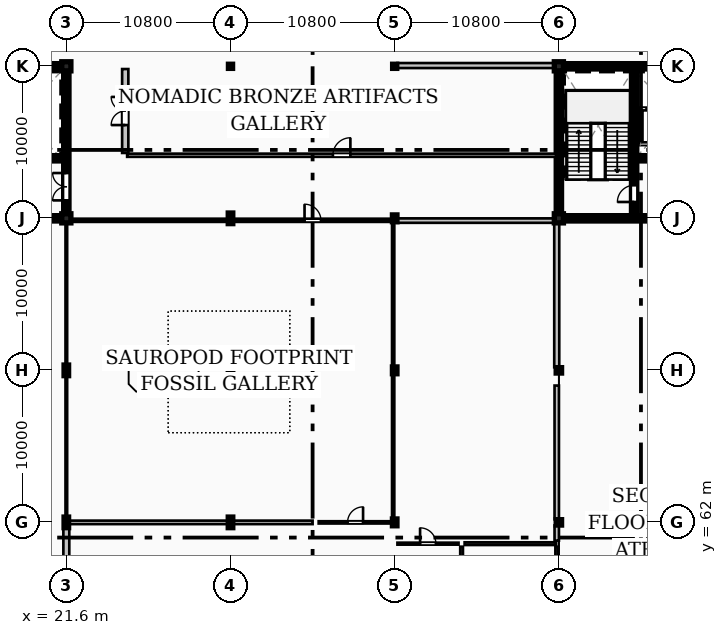
"""IFC4 building model, lengths in metres.
Left out: names, types, materials, properties, quantities, classifications, styles, units other than length and angle.
Written with IfcOpenShell. Run it as: python <this file> out.ifc"""

import sys

from ifc_helpers import new_model, si_unit, direction, frame, frame_2d, origin, origin_2d, place, context, subcontext, project, spatial, rectangle, hollow_circle, i_section, extrude, element, fill, save


model = new_model("IFC4")
c1 = context("Model", 3, precision=1e-05, world=origin(), true_north=direction((0.0, 1.0)))
c2 = subcontext(c1, "Body", "Model", "MODEL_VIEW")
j1 = project(units=[si_unit("LENGTHUNIT", "METRE"), si_unit("PLANEANGLEUNIT", "RADIAN")], contexts=[c1])
p1 = place(None, origin())
s1 = spatial("IfcSite", under=j1, at=p1, CompositionType="ELEMENT")
p2 = place(p1, origin())
s2 = spatial("IfcBuilding", under=s1, at=p2, CompositionType="ELEMENT")
p3 = place(p2, frame((0.0, 0.0, 9.6)))
s3 = spatial("IfcBuildingStorey", under=s2, at=p3, CompositionType="ELEMENT", Elevation=9.6)
for number, where, z_axis, x_axis in (
    (1, (21.6, 62.0, 0.0), (0.0, 0.0, 1.0), (1.0, 0.0, 0.0)),
    (2, (21.6, 72.0, 0.0), (0.0, 0.0, 1.0), (1.0, 0.0, 0.0)),
):
    element("IfcColumn", number, at=place(p3, frame(where, z_axis=z_axis, x_axis=x_axis)), inside=s3, PredefinedType="COLUMN", context=c2, shape_type="SweptSolid", body=[
        extrude(i_section(OverallWidth=0.3, OverallDepth=0.7, WebThickness=0.017, FlangeThickness=0.032, FilletRadius=0.027, at=origin_2d()), origin(), (0.0, 0.0, 1.0), 4.8),
    ])
for number, where, z_axis, x_axis in (
    (3, (21.6, 82.0, 0.0), (0.0, 0.0, 1.0), (1.0, 0.0, 0.0)),
    (4, (21.6, 92.0, 0.0), (0.0, 0.0, 1.0), (1.0, 0.0, 0.0)),
):
    element("IfcColumn", number, at=place(p3, frame(where, z_axis=z_axis, x_axis=x_axis)), inside=s3, PredefinedType="COLUMN", context=c2, shape_type="SweptSolid", body=[
        extrude(rectangle(XDim=0.6, YDim=0.6, at=origin_2d()), origin(), (0.0, 0.0, 1.0), 4.8),
    ])
for number, where, z_axis, x_axis in (
    (5, (32.4, 62.0, 0.0), (0.0, 0.0, 1.0), (1.0, 0.0, 0.0)),
    (6, (32.4, 72.0, 0.0), (0.0, 0.0, 1.0), (1.0, 0.0, 0.0)),
    (7, (32.4, 82.0, 0.0), (0.0, 0.0, 1.0), (1.0, 0.0, 0.0)),
):
    element("IfcColumn", number, at=place(p3, frame(where, z_axis=z_axis, x_axis=x_axis)), inside=s3, PredefinedType="COLUMN", context=c2, shape_type="SweptSolid", body=[
        extrude(i_section(OverallWidth=0.3, OverallDepth=0.7, WebThickness=0.017, FlangeThickness=0.032, FilletRadius=0.027, at=origin_2d()), origin(), (0.0, 0.0, 1.0), 4.8),
    ])
p4 = place(p3, frame((32.4, 92.0, 0.0), z_axis=(0.0, 0.0, 1.0), x_axis=(1.0, 0.0, 0.0)))
e8 = element("IfcColumn", 8, at=p4, inside=s3, PredefinedType="COLUMN", context=c2, shape_type="SweptSolid", body=[
    extrude(hollow_circle(Radius=0.136, WallThickness=0.012, at=origin_2d()), origin(), (0.0, 0.0, 1.0), 4.8),
])
for number, where, z_axis, x_axis in (
    (9, (43.2, 62.0, 0.0), (0.0, 0.0, 1.0), (1.0, 0.0, 0.0)),
    (10, (43.2, 72.0, 0.0), (0.0, 0.0, 1.0), (1.0, 0.0, 0.0)),
    (11, (43.2, 82.0, 0.0), (0.0, 0.0, 1.0), (1.0, 0.0, 0.0)),
):
    element("IfcColumn", number, at=place(p3, frame(where, z_axis=z_axis, x_axis=x_axis)), inside=s3, PredefinedType="COLUMN", context=c2, shape_type="SweptSolid", body=[
        extrude(i_section(OverallWidth=0.3, OverallDepth=0.45, WebThickness=0.014, FlangeThickness=0.026, FilletRadius=0.027, at=origin_2d()), origin(), (0.0, 0.0, 1.0), 4.8),
    ])
p5 = place(p3, frame((43.2, 92.0, 0.0), z_axis=(0.0, 0.0, 1.0), x_axis=(1.0, 0.0, 0.0)))
e12 = element("IfcColumn", 12, at=p5, inside=s3, PredefinedType="COLUMN", context=c2, shape_type="SweptSolid", body=[
    extrude(hollow_circle(Radius=0.136, WallThickness=0.012, at=origin_2d()), origin(), (0.0, 0.0, 1.0), 4.8),
])
for number, where, z_axis, x_axis in (
    (13, (54.0, 62.0, 0.0), (0.0, 0.0, 1.0), (1.0, 0.0, 0.0)),
    (14, (54.0, 72.0, 0.0), (0.0, 0.0, 1.0), (1.0, 0.0, 0.0)),
):
    element("IfcColumn", number, at=place(p3, frame(where, z_axis=z_axis, x_axis=x_axis)), inside=s3, PredefinedType="COLUMN", context=c2, shape_type="SweptSolid", body=[
        extrude(hollow_circle(Radius=0.178, WallThickness=0.016, at=origin_2d()), origin(), (0.0, 0.0, 1.0), 4.8),
    ])
for number, where, z_axis, x_axis in (
    (15, (54.0, 82.0, 0.0), (0.0, 0.0, 1.0), (1.0, 0.0, 0.0)),
    (16, (54.0, 92.0, 0.0), (0.0, 0.0, 1.0), (1.0, 0.0, 0.0)),
):
    element("IfcColumn", number, at=place(p3, frame(where, z_axis=z_axis, x_axis=x_axis)), inside=s3, PredefinedType="COLUMN", context=c2, shape_type="SweptSolid", body=[
        extrude(rectangle(XDim=0.6, YDim=0.6, at=origin_2d()), origin(), (0.0, 0.0, 1.0), 4.8),
    ])
for number, where, z_axis, x_axis in (
    (17, (11.1, 82.0, 0.0), (0.0, 0.0, 1.0), (1.0, 0.0, 0.0)),
    (18, (11.1, 92.0, 0.0), (0.0, 0.0, 1.0), (1.0, 0.0, 0.0)),
):
    element("IfcWall", number, at=place(p3, frame(where, z_axis=z_axis, x_axis=x_axis)), inside=s3, PredefinedType="SHEAR", context=c2, shape_type="SweptSolid", body=[
        extrude(rectangle(XDim=10.2, YDim=0.35, at=frame_2d((5.1, 0.0))), origin(), (0.0, 0.0, 1.0), 4.56),
    ])
p6 = place(p3, frame((21.6, 82.3, 0.0), z_axis=(0.0, 0.0, 1.0), x_axis=(0.0, 1.0, 0.0)))
e19 = element("IfcWall", 19, at=p6, inside=s3, PredefinedType="SHEAR", context=c2, shape_type="SweptSolid", body=[
    extrude(rectangle(XDim=9.4, YDim=0.35, at=frame_2d((4.7, 0.0))), origin(), (0.0, 0.0, 1.0), 4.56),
])
p7 = place(p6, frame((0.88, 0.0, 0.0)))
e20 = element("IfcOpeningElement", 20, at=p7, cuts=e19, PredefinedType="OPENING", context=c2, shape_type="SweptSolid", body=[
    extrude(rectangle(XDim=1.8, YDim=2.25, at=frame_2d((0.9, 1.125))), frame((0.0, 0.185, 0.0), z_axis=(0.0, -1.0, 0.0), x_axis=(1.0, 0.0, 0.0)), (0.0, 0.0, 1.0), 0.37),
])
p8 = place(p3, frame((15.93, 85.95, 0.0), z_axis=(0.0, 0.0, 1.0), x_axis=(1.0, 0.0, 0.0)))
e21 = element("IfcWall", 21, at=p8, inside=s3, PredefinedType="SHEAR", context=c2, shape_type="SweptSolid", body=[
    extrude(rectangle(XDim=5.49, YDim=0.35, at=frame_2d((2.745, 0.0))), origin(), (0.0, 0.0, 1.0), 4.56),
])
p9 = place(p8, frame((0.65, 0.0, 0.0)))
e22 = element("IfcOpeningElement", 22, at=p9, cuts=e21, PredefinedType="OPENING", context=c2, shape_type="SweptSolid", body=[
    extrude(rectangle(XDim=1.1, YDim=2.2, at=frame_2d((0.55, 1.1))), frame((0.0, 0.185, 0.0), z_axis=(0.0, -1.0, 0.0), x_axis=(1.0, 0.0, 0.0)), (0.0, 0.0, 1.0), 0.37),
])
p10 = place(p8, frame((2.85, 0.0, 0.0)))
e23 = element("IfcOpeningElement", 23, at=p10, cuts=e21, PredefinedType="OPENING", context=c2, shape_type="SweptSolid", body=[
    extrude(rectangle(XDim=1.1, YDim=2.2, at=frame_2d((0.55, 1.1))), frame((0.0, 0.185, 0.0), z_axis=(0.0, -1.0, 0.0), x_axis=(1.0, 0.0, 0.0)), (0.0, 0.0, 1.0), 0.37),
])
for number, where, z_axis, x_axis in (
    (24, (54.3, 82.0, 0.0), (0.0, 0.0, 1.0), (1.0, 0.0, 0.0)),
    (25, (54.3, 92.0, 0.0), (0.0, 0.0, 1.0), (1.0, 0.0, 0.0)),
):
    element("IfcWall", number, at=place(p3, frame(where, z_axis=z_axis, x_axis=x_axis)), inside=s3, PredefinedType="SHEAR", context=c2, shape_type="SweptSolid", body=[
        extrude(rectangle(XDim=10.2, YDim=0.35, at=frame_2d((5.1, 0.0))), origin(), (0.0, 0.0, 1.0), 4.56),
    ])
p11 = place(p3, frame((54.0, 82.3, 0.0), z_axis=(0.0, 0.0, 1.0), x_axis=(0.0, 1.0, 0.0)))
e26 = element("IfcWall", 26, at=p11, inside=s3, PredefinedType="SHEAR", context=c2, shape_type="SweptSolid", body=[
    extrude(rectangle(XDim=9.4, YDim=0.35, at=frame_2d((4.7, 0.0))), origin(), (0.0, 0.0, 1.0), 4.56),
])
p12 = place(p3, frame((58.95, 82.175, 0.0), z_axis=(0.0, 0.0, 1.0), x_axis=(0.0, 1.0, 0.0)))
e27 = element("IfcWall", 27, at=p12, inside=s3, PredefinedType="SHEAR", context=c2, shape_type="SweptSolid", body=[
    extrude(rectangle(XDim=9.65, YDim=0.35, at=frame_2d((4.825, 0.0))), origin(), (0.0, 0.0, 1.0), 4.56),
])
p13 = place(p12, frame((0.9, 0.0, 0.0)))
e28 = element("IfcOpeningElement", 28, at=p13, cuts=e27, PredefinedType="OPENING", context=c2, shape_type="SweptSolid", body=[
    extrude(rectangle(XDim=1.1, YDim=2.2, at=frame_2d((0.55, 1.1))), frame((0.0, 0.185, 0.0), z_axis=(0.0, -1.0, 0.0), x_axis=(1.0, 0.0, 0.0)), (0.0, 0.0, 1.0), 0.37),
])
p14 = place(p3, frame((59.13, 85.95, 0.0), z_axis=(0.0, 0.0, 1.0), x_axis=(1.0, 0.0, 0.0)))
e29 = element("IfcWall", 29, at=p14, inside=s3, PredefinedType="SHEAR", context=c2, shape_type="SweptSolid", body=[
    extrude(rectangle(XDim=5.49, YDim=0.35, at=frame_2d((2.745, 0.0))), origin(), (0.0, 0.0, 1.0), 4.56),
])
p15 = place(p14, frame((0.65, 0.0, 0.0)))
e30 = element("IfcOpeningElement", 30, at=p15, cuts=e29, PredefinedType="OPENING", context=c2, shape_type="SweptSolid", body=[
    extrude(rectangle(XDim=1.1, YDim=2.2, at=frame_2d((0.55, 1.1))), frame((0.0, 0.185, 0.0), z_axis=(0.0, -1.0, 0.0), x_axis=(1.0, 0.0, 0.0)), (0.0, 0.0, 1.0), 0.37),
])
p16 = place(p14, frame((2.85, 0.0, 0.0)))
e31 = element("IfcOpeningElement", 31, at=p16, cuts=e29, PredefinedType="OPENING", context=c2, shape_type="SweptSolid", body=[
    extrude(rectangle(XDim=2.0, YDim=2.5, at=frame_2d((1.0, 1.25))), frame((0.0, 0.185, 0.0), z_axis=(0.0, -1.0, 0.0), x_axis=(1.0, 0.0, 0.0)), (0.0, 0.0, 1.0), 0.37),
])
p17 = place(p3, frame((43.38, 60.6, 0.0), z_axis=(0.0, 0.0, 1.0), x_axis=(1.0, 0.0, 0.0)))
e32 = element("IfcWall", 32, at=p17, inside=s3, PredefinedType="PARTITIONING", context=c2, shape_type="SweptSolid", body=[
    extrude(rectangle(XDim=4.02, YDim=0.13, at=frame_2d((2.01, 0.0))), origin(), (0.0, 0.0, 1.0), 4.52),
])
p18 = place(p17, frame((1.49, 0.0, 0.0)))
e33 = element("IfcOpeningElement", 33, at=p18, cuts=e32, PredefinedType="OPENING", context=c2, shape_type="SweptSolid", body=[
    extrude(rectangle(XDim=1.04, YDim=2.2, at=frame_2d((0.52, 1.1))), frame((0.0, 0.075, 0.0), z_axis=(0.0, -1.0, 0.0), x_axis=(1.0, 0.0, 0.0)), (0.0, 0.0, 1.0), 0.15),
])
p19 = place(p3, frame((38.2, 62.0, 0.0), z_axis=(0.0, 0.0, 1.0), x_axis=(1.0, 0.0, 0.0)))
e34 = element("IfcWall", 34, at=p19, inside=s3, PredefinedType="PARTITIONING", context=c2, shape_type="SweptSolid", body=[
    extrude(rectangle(XDim=4.82, YDim=0.15, at=frame_2d((2.41, 0.0))), origin(), (0.0, 0.0, 1.0), 4.099),
])
p20 = place(p19, frame((1.9, 0.0, 0.0)))
e35 = element("IfcOpeningElement", 35, at=p20, cuts=e34, PredefinedType="OPENING", context=c2, shape_type="SweptSolid", body=[
    extrude(rectangle(XDim=1.02, YDim=2.2, at=frame_2d((0.51, 1.1))), frame((0.0, 0.085, 0.0), z_axis=(0.0, -1.0, 0.0), x_axis=(1.0, 0.0, 0.0)), (0.0, 0.0, 1.0), 0.17),
])
p21 = place(p3, frame((21.78, 81.85, 0.0), z_axis=(0.0, 0.0, 1.0), x_axis=(1.0, 0.0, 0.0)))
e36 = element("IfcWall", 36, at=p21, inside=s3, PredefinedType="PARTITIONING", context=c2, shape_type="SweptSolid", body=[
    extrude(rectangle(XDim=10.42, YDim=0.17, at=frame_2d((5.21, 0.0))), origin(), (0.0, 0.0, 1.0), 3.94),
])
p22 = place(p3, frame((32.6, 81.85, 0.0), z_axis=(0.0, 0.0, 1.0), x_axis=(1.0, 0.0, 0.0)))
e37 = element("IfcWall", 37, at=p22, inside=s3, PredefinedType="PARTITIONING", context=c2, shape_type="SweptSolid", body=[
    extrude(rectangle(XDim=10.42, YDim=0.17, at=frame_2d((5.21, 0.0))), origin(), (0.0, 0.0, 1.0), 4.09),
])
p23 = place(p22, frame((4.67, 0.0, 0.0)))
e38 = element("IfcOpeningElement", 38, at=p23, cuts=e37, PredefinedType="OPENING", context=c2, shape_type="SweptSolid", body=[
    extrude(rectangle(XDim=1.08, YDim=2.25, at=frame_2d((0.54, 1.125))), frame((0.0, 0.095, 0.0), z_axis=(0.0, -1.0, 0.0), x_axis=(1.0, 0.0, 0.0)), (0.0, 0.0, 1.0), 0.19),
])
p24 = place(p3, frame((25.6, 86.15, 0.0), z_axis=(0.0, 0.0, 1.0), x_axis=(1.0, 0.0, 0.0)))
e39 = element("IfcWall", 39, at=p24, inside=s3, PredefinedType="PARTITIONING", context=c2, shape_type="SweptSolid", body=[
    extrude(rectangle(XDim=28.22, YDim=0.21, at=frame_2d((14.11, 0.0))), origin(), (0.0, 0.0, 1.0), 4.52),
])
p25 = place(p24, frame((13.535, 0.0, 0.0)))
e40 = element("IfcOpeningElement", 40, at=p25, cuts=e39, PredefinedType="OPENING", context=c2, shape_type="SweptSolid", body=[
    extrude(rectangle(XDim=1.15, YDim=2.25, at=frame_2d((0.575, 1.125))), frame((0.0, 0.115, 0.0), z_axis=(0.0, -1.0, 0.0), x_axis=(1.0, 0.0, 0.0)), (0.0, 0.0, 1.0), 0.23),
])
p26 = place(p3, frame((25.475, 86.3, 0.0), z_axis=(0.0, 0.0, 1.0), x_axis=(0.0, 1.0, 0.0)))
e41 = element("IfcWall", 41, at=p26, inside=s3, PredefinedType="PARTITIONING", context=c2, shape_type="SweptSolid", body=[
    extrude(rectangle(XDim=5.52, YDim=0.41, at=frame_2d((2.76, 0.0))), origin(), (0.0, 0.0, 1.0), 4.52),
])
p27 = place(p26, frame((1.835, 0.0, 0.0)))
e42 = element("IfcOpeningElement", 42, at=p27, cuts=e41, PredefinedType="OPENING", context=c2, shape_type="SweptSolid", body=[
    extrude(rectangle(XDim=1.85, YDim=2.45, at=frame_2d((0.925, 1.225))), frame((0.0, 0.215, 0.0), z_axis=(0.0, -1.0, 0.0), x_axis=(1.0, 0.0, 0.0)), (0.0, 0.0, 1.0), 0.43),
])
p28 = place(p3, frame((47.6, 55.6, 0.0), z_axis=(0.0, 0.0, 1.0), x_axis=(0.0, 1.0, 0.0)))
e43 = element("IfcWall", 43, at=p28, inside=s3, PredefinedType="PLUMBINGWALL", context=c2, shape_type="SweptSolid", body=[
    extrude(rectangle(XDim=4.8, YDim=0.18, at=frame_2d((2.4, 0.0))), origin(), (0.0, 0.0, 1.0), 4.52),
])
p29 = place(p28, frame((1.875, 0.0, 0.0)))
e44 = element("IfcOpeningElement", 44, at=p29, cuts=e43, PredefinedType="OPENING", context=c2, shape_type="SweptSolid", body=[
    extrude(rectangle(XDim=1.05, YDim=2.15, at=frame_2d((0.525, 1.075))), frame((0.0, 0.1, 0.0), z_axis=(0.0, -1.0, 0.0), x_axis=(1.0, 0.0, 0.0)), (0.0, 0.0, 1.0), 0.2),
])
p30 = place(p3, frame((47.8, 60.6, 0.0), z_axis=(0.0, 0.0, 1.0), x_axis=(1.0, 0.0, 0.0)))
e45 = element("IfcWall", 45, at=p30, inside=s3, PredefinedType="PLUMBINGWALL", context=c2, shape_type="SweptSolid", body=[
    extrude(rectangle(XDim=6.02, YDim=0.18, at=frame_2d((3.01, 0.0))), origin(), (0.0, 0.0, 1.0), 4.52),
])
p31 = place(p3, frame((21.78, 62.0, 0.0), z_axis=(0.0, 0.0, 1.0), x_axis=(1.0, 0.0, 0.0)))
e46 = element("IfcWall", 46, at=p31, inside=s3, PredefinedType="PARTITIONING", context=c2, shape_type="SweptSolid", body=[
    extrude(rectangle(XDim=10.42, YDim=0.23, at=frame_2d((5.21, 0.0))), origin(), (0.0, 0.0, 1.0), 3.94),
])
p32 = place(p3, frame((32.6, 62.0, 0.0), z_axis=(0.0, 0.0, 1.0), x_axis=(1.0, 0.0, 0.0)))
e47 = element("IfcWall", 47, at=p32, inside=s3, PredefinedType="PARTITIONING", context=c2, shape_type="SweptSolid", body=[
    extrude(rectangle(XDim=5.2, YDim=0.23, at=frame_2d((2.6, 0.0))), origin(), (0.0, 0.0, 1.0), 4.099),
])
p33 = place(p3, frame((43.38, 81.85, 0.0), z_axis=(0.0, 0.0, 1.0), x_axis=(1.0, 0.0, 0.0)))
e48 = element("IfcWall", 48, at=p33, inside=s3, PredefinedType="PARTITIONING", context=c2, shape_type="SweptSolid", body=[
    extrude(rectangle(XDim=10.44, YDim=0.29, at=frame_2d((5.22, 0.0))), origin(), (0.0, 0.0, 1.0), 4.09),
])
p34 = place(p3, frame((43.38, 92.05, 0.0), z_axis=(0.0, 0.0, 1.0), x_axis=(1.0, 0.0, 0.0)))
e49 = element("IfcWall", 49, at=p34, inside=s3, PredefinedType="PARTITIONING", context=c2, shape_type="SweptSolid", body=[
    extrude(rectangle(XDim=10.44, YDim=0.33, at=frame_2d((5.22, 0.0))), origin(), (0.0, 0.0, 1.0), 4.119),
])
p35 = place(p3, frame((21.6, 50.2, 0.0), z_axis=(0.0, 0.0, 1.0), x_axis=(0.0, 1.0, 0.0)))
e50 = element("IfcWall", 50, at=p35, inside=s3, PredefinedType="PARTITIONING", context=c2, shape_type="SweptSolid", body=[
    extrude(rectangle(XDim=11.62, YDim=0.39, at=frame_2d((5.81, 0.0))), origin(), (0.0, 0.0, 1.0), 3.94),
])
for number, where, z_axis, x_axis in (
    (51, (21.6, 62.18, 0.0), (0.0, 0.0, 1.0), (0.0, 1.0, 0.0)),
    (52, (21.6, 72.2, 0.0), (0.0, 0.0, 1.0), (0.0, 1.0, 0.0)),
):
    element("IfcWall", number, at=place(p3, frame(where, z_axis=z_axis, x_axis=x_axis)), inside=s3, PredefinedType="PARTITIONING", context=c2, shape_type="SweptSolid", body=[
        extrude(rectangle(XDim=9.62, YDim=0.11, at=frame_2d((4.81, 0.0))), origin(), (0.0, 0.0, 1.0), 4.039),
    ])
for number, where, z_axis, x_axis in (
    (53, (43.1, 62.18, 0.0), (0.0, 0.0, 1.0), (0.0, 1.0, 0.0)),
    (54, (43.1, 72.2, 0.0), (0.0, 0.0, 1.0), (0.0, 1.0, 0.0)),
):
    element("IfcWall", number, at=place(p3, frame(where, z_axis=z_axis, x_axis=x_axis)), inside=s3, PredefinedType="PARTITIONING", context=c2, shape_type="SweptSolid", body=[
        extrude(rectangle(XDim=9.62, YDim=0.15, at=frame_2d((4.81, 0.0))), origin(), (0.0, 0.0, 1.0), 4.039),
    ])
p36 = place(p3, frame((53.86, 55.6, 0.0), z_axis=(0.0, 0.0, 1.0), x_axis=(0.0, 1.0, 0.0)))
e55 = element("IfcWall", 55, at=p36, inside=s3, PredefinedType="PLUMBINGWALL", context=c2, shape_type="SweptSolid", body=[
    extrude(rectangle(XDim=4.8, YDim=0.18, at=frame_2d((2.4, 0.0))), origin(), (0.0, 0.0, 1.0), 4.52),
])
p37 = place(p3, frame((53.86, 60.8, 0.0), z_axis=(0.0, 0.0, 1.0), x_axis=(0.0, 1.0, 0.0)))
e56 = element("IfcWall", 56, at=p37, inside=s3, PredefinedType="PARTITIONING", context=c2, shape_type="SweptSolid", body=[
    extrude(rectangle(XDim=1.0, YDim=0.29, at=frame_2d((0.5, 0.0))), origin(), (0.0, 0.0, 1.0), 4.52),
])
p38 = place(p3, frame((53.86, 62.2, 0.0), z_axis=(0.0, 0.0, 1.0), x_axis=(0.0, 1.0, 0.0)))
e57 = element("IfcWall", 57, at=p38, inside=s3, PredefinedType="PARTITIONING", context=c2, shape_type="SweptSolid", body=[
    extrude(rectangle(XDim=8.8, YDim=0.29, at=frame_2d((4.4, 0.0))), origin(), (0.0, 0.0, 1.0), 4.52),
])
p39 = place(p3, frame((53.86, 72.2, 0.0), z_axis=(0.0, 0.0, 1.0), x_axis=(0.0, 1.0, 0.0)))
e58 = element("IfcWall", 58, at=p39, inside=s3, PredefinedType="PARTITIONING", context=c2, shape_type="SweptSolid", body=[
    extrude(rectangle(XDim=9.62, YDim=0.33, at=frame_2d((4.81, 0.0))), origin(), (0.0, 0.0, 1.0), 4.52),
])
p40 = place(p7, origin())
e59 = element("IfcDoor", 59, at=p40, inside=s3, OperationType="DOUBLE_DOOR_SINGLE_SWING", PredefinedType="DOOR", context=c2, shape_type="SweptSolid", body=[
    extrude(rectangle(XDim=1.8, YDim=2.25, at=frame_2d((0.9, 1.125))), frame((0.0, 0.025, 0.0), z_axis=(0.0, -1.0, 0.0), x_axis=(1.0, 0.0, 0.0)), (0.0, 0.0, 1.0), 0.05),
])
fill(e20, e59)
p41 = place(p13, origin())
e60 = element("IfcDoor", 60, at=p41, inside=s3, OperationType="SINGLE_SWING_LEFT", PredefinedType="DOOR", context=c2, shape_type="SweptSolid", body=[
    extrude(rectangle(XDim=1.1, YDim=2.2, at=frame_2d((0.55, 1.1))), frame((0.0, 0.025, 0.0), z_axis=(0.0, -1.0, 0.0), x_axis=(1.0, 0.0, 0.0)), (0.0, 0.0, 1.0), 0.05),
])
fill(e28, e60)
p42 = place(p15, origin())
e61 = element("IfcDoor", 61, at=p42, inside=s3, OperationType="DOUBLE_DOOR_SLIDING", PredefinedType="DOOR", context=c2, shape_type="SweptSolid", body=[
    extrude(rectangle(XDim=1.1, YDim=2.2, at=frame_2d((0.55, 1.1))), frame((0.0, 0.025, 0.0), z_axis=(0.0, -1.0, 0.0), x_axis=(1.0, 0.0, 0.0)), (0.0, 0.0, 1.0), 0.05),
])
fill(e30, e61)
p43 = place(p18, origin())
e62 = element("IfcDoor", 62, at=p43, inside=s3, OperationType="SINGLE_SWING_LEFT", PredefinedType="DOOR", context=c2, shape_type="SweptSolid", body=[
    extrude(rectangle(XDim=1.04, YDim=2.2, at=frame_2d((0.52, 1.1))), frame((0.0, 0.025, 0.0), z_axis=(0.0, -1.0, 0.0), x_axis=(1.0, 0.0, 0.0)), (0.0, 0.0, 1.0), 0.05),
])
fill(e33, e62)
p44 = place(p20, origin())
e63 = element("IfcDoor", 63, at=p44, inside=s3, OperationType="SINGLE_SWING_RIGHT", PredefinedType="DOOR", context=c2, shape_type="SweptSolid", body=[
    extrude(rectangle(XDim=1.02, YDim=2.2, at=frame_2d((0.51, 1.1))), frame((0.0, 0.025, 0.0), z_axis=(0.0, -1.0, 0.0), x_axis=(1.0, 0.0, 0.0)), (0.0, 0.0, 1.0), 0.05),
])
fill(e35, e63)
p45 = place(p23, origin())
e64 = element("IfcDoor", 64, at=p45, inside=s3, OperationType="SINGLE_SWING_LEFT", PredefinedType="DOOR", context=c2, shape_type="SweptSolid", body=[
    extrude(rectangle(XDim=1.08, YDim=2.25, at=frame_2d((0.54, 1.125))), frame((0.0, 0.025, 0.0), z_axis=(0.0, -1.0, 0.0), x_axis=(1.0, 0.0, 0.0)), (0.0, 0.0, 1.0), 0.05),
])
fill(e38, e64)
p46 = place(p25, origin())
e65 = element("IfcDoor", 65, at=p46, inside=s3, OperationType="SINGLE_SWING_RIGHT", PredefinedType="DOOR", context=c2, shape_type="SweptSolid", body=[
    extrude(rectangle(XDim=1.15, YDim=2.25, at=frame_2d((0.575, 1.125))), frame((0.0, 0.025, 0.0), z_axis=(0.0, -1.0, 0.0), x_axis=(1.0, 0.0, 0.0)), (0.0, 0.0, 1.0), 0.05),
])
fill(e40, e65)
p47 = place(p27, origin())
e66 = element("IfcDoor", 66, at=p47, inside=s3, OperationType="DOUBLE_DOOR_SINGLE_SWING", PredefinedType="DOOR", context=c2, shape_type="SweptSolid", body=[
    extrude(rectangle(XDim=1.85, YDim=2.45, at=frame_2d((0.925, 1.225))), frame((0.0, 0.025, 0.0), z_axis=(0.0, -1.0, 0.0), x_axis=(1.0, 0.0, 0.0)), (0.0, 0.0, 1.0), 0.05),
])
fill(e42, e66)
save(model, sys.argv[1])
